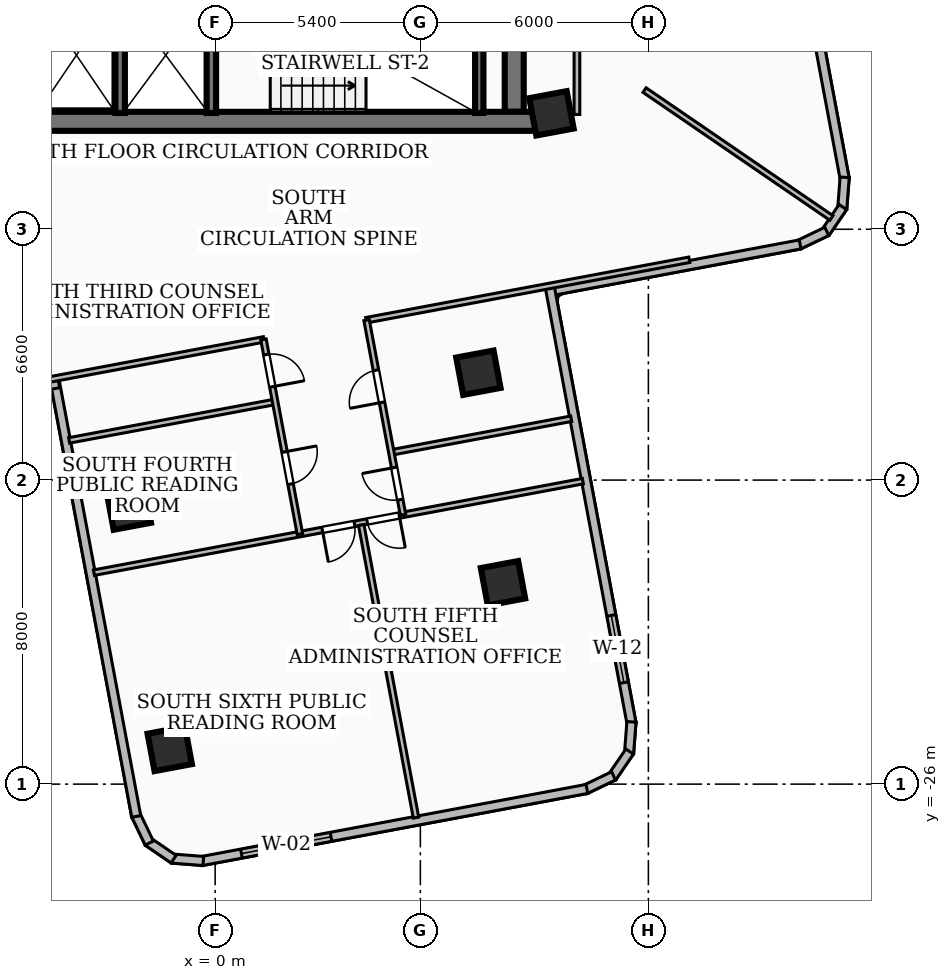
"""IFC4 building model, lengths in metres.
Left out: names, types, materials, properties, quantities, classifications, styles, units other than length and angle.
Written with IfcOpenShell. Run it as: python <this file> out.ifc"""

import sys

from ifc_helpers import new_model, si_unit, direction, frame, frame_2d, origin, origin_2d, place, context, subcontext, project, spatial, rectangle, extrude, element, fill, save


model = new_model("IFC4")
c1 = context("Model", 3, precision=1e-05, world=origin(), true_north=direction((0.0, 1.0)))
c2 = subcontext(c1, "Body", "Model", "MODEL_VIEW")
j1 = project(units=[si_unit("LENGTHUNIT", "METRE"), si_unit("PLANEANGLEUNIT", "RADIAN")], contexts=[c1])
p1 = place(None, origin())
s1 = spatial("IfcSite", under=j1, at=p1, CompositionType="ELEMENT")
p2 = place(p1, origin())
s2 = spatial("IfcBuilding", under=s1, at=p2, CompositionType="ELEMENT")
p3 = place(p2, frame((0.0, 0.0, 100.08)))
s3 = spatial("IfcBuildingStorey", under=s2, at=p3, CompositionType="ELEMENT", Elevation=100.08)
p4 = place(p3, frame((8.78, -8.56, 0.0), z_axis=(0.0, 0.0, 1.0), x_axis=(-1.0, 0.0, 0.0)))
e1 = element("IfcWall", 1, at=p4, inside=s3, PredefinedType="SHEAR", context=c2, shape_type="SweptSolid", body=[
    extrude(rectangle(XDim=17.56, YDim=0.5, at=frame_2d((8.78, 0.0))), origin(), (0.0, 0.0, 1.0), 3.34),
])
p5 = place(p3, frame((7.87, -2.0, 0.0), z_axis=(0.0, 0.0, 1.0), x_axis=(0.0, -1.0, 0.0)))
e2 = element("IfcWall", 2, at=p5, inside=s3, PredefinedType="SHEAR", context=c2, shape_type="SweptSolid", body=[
    extrude(rectangle(XDim=6.31, YDim=0.5, at=frame_2d((3.155, 0.0))), origin(), (0.0, 0.0, 1.0), 3.34),
])
p6 = place(p3, frame((6.95, -8.34, 0.0), z_axis=(0.0, 0.0, 1.0), x_axis=(0.0, 1.0, 0.0)))
e3 = element("IfcWall", 3, at=p6, inside=s3, PredefinedType="SOLIDWALL", context=c2, shape_type="SweptSolid", body=[
    extrude(rectangle(XDim=3.06, YDim=0.22, at=frame_2d((1.53, 0.0))), origin(), (0.0, 0.0, 1.0), 3.34),
])
for number, where, z_axis, x_axis in (
    (4, (-0.1, -8.34, 0.0), (0.0, 0.0, 1.0), (0.0, 1.0, 0.0)),
    (5, (-2.5, -8.34, 0.0), (0.0, 0.0, 1.0), (0.0, 1.0, 0.0)),
):
    element("IfcWall", number, at=place(p3, frame(where, z_axis=z_axis, x_axis=x_axis)), inside=s3, PredefinedType="SOLIDWALL", context=c2, shape_type="SweptSolid", body=[
        extrude(rectangle(XDim=3.04, YDim=0.25, at=frame_2d((1.52, 0.0))), origin(), (0.0, 0.0, 1.0), 3.34),
    ])
for number, where, z_axis, x_axis in (
    (6, (8.85, -8.35, 0.0), (0.0, 0.0, 1.0), (0.983, 0.184, 0.0)),
    (7, (-2.271, -18.724, 0.0), (0.0, 0.0, 1.0), (0.983, 0.184, 0.0)),
    (8, (6.927, -15.175, 0.0), (0.0, 0.0, 1.0), (0.983, 0.184, 0.0)),
    (9, (-1.195, -25.074, 0.0), (0.0, 0.0, 1.0), (0.983, 0.184, 0.0)),
    (10, (7.574, -20.714, 0.0), (0.0, 0.0, 1.0), (0.983, 0.184, 0.0)),
):
    element("IfcColumn", number, at=place(p3, frame(where, z_axis=z_axis, x_axis=x_axis)), inside=s3, PredefinedType="COLUMN", context=c2, shape_type="SweptSolid", body=[
        extrude(rectangle(XDim=1.0, YDim=1.0, at=origin_2d()), origin(), (0.0, 0.0, 1.0), 3.6),
    ])
p7 = place(p3, frame((15.45, -4.113, 0.0), z_axis=(0.0, 0.0, 1.0), x_axis=(0.18406771587, -0.982913564854, 0.0)))
e11 = element("IfcWall", 11, at=p7, inside=s3, PredefinedType="SOLIDWALL", context=c2, shape_type="SweptSolid", body=[
    extrude(rectangle(XDim=6.075, YDim=0.24, at=frame_2d((3.037, 0.0))), origin(), (0.0, 0.0, 1.0), 3.34),
])
p8 = place(p3, frame((16.565, -10.034, 0.0), z_axis=(0.0, 0.0, 1.0), x_axis=(-0.077011179273, -0.997030229365, 0.0)))
e12 = element("IfcWall", 12, at=p8, inside=s3, PredefinedType="SOLIDWALL", context=c2, shape_type="SweptSolid", body=[
    extrude(rectangle(XDim=0.831, YDim=0.24, at=frame_2d((0.415, 0.0))), origin(), (0.0, 0.0, 1.0), 3.34),
])
p9 = place(p3, frame((16.517, -10.816, 0.0), z_axis=(0.0, 0.0, 1.0), x_axis=(-0.563941688624, -0.825814611055, 0.0)))
e13 = element("IfcWall", 13, at=p9, inside=s3, PredefinedType="SOLIDWALL", context=c2, shape_type="SweptSolid", body=[
    extrude(rectangle(XDim=0.814, YDim=0.24, at=frame_2d((0.407, 0.0))), origin(), (0.0, 0.0, 1.0), 3.34),
])
p10 = place(p3, frame((16.095, -11.456, 0.0), z_axis=(0.0, 0.0, 1.0), x_axis=(-0.902044756706, -0.431642510533, 0.0)))
e14 = element("IfcWall", 14, at=p10, inside=s3, PredefinedType="SOLIDWALL", context=c2, shape_type="SweptSolid", body=[
    extrude(rectangle(XDim=0.832, YDim=0.24, at=frame_2d((0.416, 0.0))), origin(), (0.0, 0.0, 1.0), 3.34),
])
p11 = place(p3, frame((15.393, -11.799, 0.0), z_axis=(0.0, 0.0, 1.0), x_axis=(-0.982891759821, -0.184184115697, 0.0)))
e15 = element("IfcWall", 15, at=p11, inside=s3, PredefinedType="SOLIDWALL", context=c2, shape_type="SweptSolid", body=[
    extrude(rectangle(XDim=6.776, YDim=0.24, at=frame_2d((3.388, 0.0))), origin(), (0.0, 0.0, 1.0), 3.34),
])
p12 = place(p3, frame((8.809, -12.935, 0.0), z_axis=(0.0, 0.0, 1.0), x_axis=(0.184057484564, -0.98291548079, 0.0)))
e16 = element("IfcWall", 16, at=p12, inside=s3, PredefinedType="SOLIDWALL", context=c2, shape_type="SweptSolid", body=[
    extrude(rectangle(XDim=11.675, YDim=0.24, at=frame_2d((5.838, 0.0))), origin(), (0.0, 0.0, 1.0), 3.34),
])
p13 = place(p12, frame((8.775, 0.0, 0.85)))
e17 = element("IfcOpeningElement", 17, at=p13, cuts=e16, PredefinedType="OPENING", context=c2, shape_type="SweptSolid", body=[
    extrude(rectangle(XDim=1.8, YDim=1.6, at=frame_2d((0.9, 0.8))), frame((0.0, 0.13, 0.0), z_axis=(0.0, -1.0, 0.0), x_axis=(1.0, 0.0, 0.0)), (0.0, 0.0, 1.0), 0.26),
])
p14 = place(p3, frame((10.955, -24.361, 0.0), z_axis=(0.0, 0.0, 1.0), x_axis=(-0.077033754987, -0.997028485347, 0.0)))
e18 = element("IfcWall", 18, at=p14, inside=s3, PredefinedType="SOLIDWALL", context=c2, shape_type="SweptSolid", body=[
    extrude(rectangle(XDim=0.83, YDim=0.24, at=frame_2d((0.415, 0.0))), origin(), (0.0, 0.0, 1.0), 3.34),
])
p15 = place(p3, frame((10.907, -25.143, 0.0), z_axis=(0.0, 0.0, 1.0), x_axis=(-0.564898876177, -0.825160141847, 0.0)))
e19 = element("IfcWall", 19, at=p15, inside=s3, PredefinedType="SOLIDWALL", context=c2, shape_type="SweptSolid", body=[
    extrude(rectangle(XDim=0.814, YDim=0.24, at=frame_2d((0.407, 0.0))), origin(), (0.0, 0.0, 1.0), 3.34),
])
p16 = place(p3, frame((10.484, -25.783, 0.0), z_axis=(0.0, 0.0, 1.0), x_axis=(-0.901656054187, -0.432453881874, 0.0)))
e20 = element("IfcWall", 20, at=p16, inside=s3, PredefinedType="SOLIDWALL", context=c2, shape_type="SweptSolid", body=[
    extrude(rectangle(XDim=0.831, YDim=0.24, at=frame_2d((0.415, 0.0))), origin(), (0.0, 0.0, 1.0), 3.34),
])
p17 = place(p3, frame((9.783, -26.126, 0.0), z_axis=(0.0, 0.0, 1.0), x_axis=(-0.98292624202, -0.184000007471, 0.0)))
e21 = element("IfcWall", 21, at=p17, inside=s3, PredefinedType="SOLIDWALL", context=c2, shape_type="SweptSolid", body=[
    extrude(rectangle(XDim=10.32, YDim=0.24, at=frame_2d((5.16, 0.0))), origin(), (0.0, 0.0, 1.0), 3.34),
])
p18 = place(p17, frame((6.85, 0.0, 0.85)))
e22 = element("IfcOpeningElement", 22, at=p18, cuts=e21, PredefinedType="OPENING", context=c2, shape_type="SweptSolid", body=[
    extrude(rectangle(XDim=2.4, YDim=2.1, at=frame_2d((1.2, 1.05))), frame((0.0, 0.13, 0.0), z_axis=(0.0, -1.0, 0.0), x_axis=(1.0, 0.0, 0.0)), (0.0, 0.0, 1.0), 0.26),
])
p19 = place(p3, frame((-0.311, -28.022, 0.0), z_axis=(0.0, 0.0, 1.0), x_axis=(-0.997028485347, 0.077033754987, 0.0)))
e23 = element("IfcWall", 23, at=p19, inside=s3, PredefinedType="SOLIDWALL", context=c2, shape_type="SweptSolid", body=[
    extrude(rectangle(XDim=0.83, YDim=0.24, at=frame_2d((0.415, 0.0))), origin(), (0.0, 0.0, 1.0), 3.34),
])
p20 = place(p3, frame((-1.093, -27.974, 0.0), z_axis=(0.0, 0.0, 1.0), x_axis=(-0.825020375165, 0.565102982263, 0.0)))
e24 = element("IfcWall", 24, at=p20, inside=s3, PredefinedType="SOLIDWALL", context=c2, shape_type="SweptSolid", body=[
    extrude(rectangle(XDim=0.814, YDim=0.24, at=frame_2d((0.407, 0.0))), origin(), (0.0, 0.0, 1.0), 3.34),
])
p21 = place(p3, frame((-1.733, -27.551, 0.0), z_axis=(0.0, 0.0, 1.0), x_axis=(-0.432339276243, 0.901711012585, 0.0)))
e25 = element("IfcWall", 25, at=p21, inside=s3, PredefinedType="SOLIDWALL", context=c2, shape_type="SweptSolid", body=[
    extrude(rectangle(XDim=0.831, YDim=0.24, at=frame_2d((0.415, 0.0))), origin(), (0.0, 0.0, 1.0), 3.34),
])
p22 = place(p3, frame((-2.076, -26.85, 0.0), z_axis=(0.0, 0.0, 1.0), x_axis=(-0.18407390356, 0.982912406081, 0.0)))
e26 = element("IfcWall", 26, at=p22, inside=s3, PredefinedType="SOLIDWALL", context=c2, shape_type="SweptSolid", body=[
    extrude(rectangle(XDim=11.676, YDim=0.24, at=frame_2d((5.838, 0.0))), origin(), (0.0, 0.0, 1.0), 2.486),
])
p23 = place(p3, frame((-4.113, -15.45, 0.0), z_axis=(0.0, 0.0, 1.0), x_axis=(-0.982913564854, -0.18406771587, 0.0)))
e27 = element("IfcWall", 27, at=p23, inside=s3, PredefinedType="SOLIDWALL", context=c2, shape_type="SweptSolid", body=[
    extrude(rectangle(XDim=6.075, YDim=0.24, at=frame_2d((3.037, 0.0))), origin(), (0.0, 0.0, 1.0), 2.486),
])
p24 = place(p3, frame((9.52, -8.38, 0.0), z_axis=(0.0, 0.0, 1.0), x_axis=(0.0, 1.0, 0.0)))
e28 = element("IfcWall", 28, at=p24, inside=s3, PredefinedType="PARTITIONING", context=c2, shape_type="SweptSolid", body=[
    extrude(rectangle(XDim=6.63, YDim=0.15, at=frame_2d((3.315, 0.0))), origin(), (0.0, 0.0, 1.0), 2.486),
])
p25 = place(p3, frame((11.3, -7.738, 0.0), z_axis=(0.0, 0.0, 1.0), x_axis=(0.825173577049, -0.564879250584, 0.0)))
e29 = element("IfcWall", 29, at=p25, inside=s3, PredefinedType="PARTITIONING", context=c2, shape_type="SweptSolid", body=[
    extrude(rectangle(XDim=5.959, YDim=0.145, at=frame_2d((2.979, 0.0))), origin(), (0.0, 0.0, 1.0), 3.34),
])
p26 = place(p3, frame((3.975, -13.794, 0.0), z_axis=(0.0, 0.0, 1.0), x_axis=(0.982936035358, 0.183947683851, 0.0)))
e30 = element("IfcWall", 30, at=p26, inside=s3, PredefinedType="PARTITIONING", context=c2, shape_type="SweptSolid", body=[
    extrude(rectangle(XDim=8.65, YDim=0.145, at=frame_2d((4.325, 0.0))), origin(), (0.0, 0.0, 1.0), 2.486),
])
p27 = place(p3, frame((-6.532, -15.761, 0.0), z_axis=(0.0, 0.0, 1.0), x_axis=(0.98292290903, 0.184017811376, 0.0)))
e31 = element("IfcWall", 31, at=p27, inside=s3, PredefinedType="PARTITIONING", context=c2, shape_type="SweptSolid", body=[
    extrude(rectangle(XDim=7.95, YDim=0.145, at=frame_2d((3.975, 0.0))), origin(), (0.0, 0.0, 1.0), 2.486),
])
p28 = place(p3, frame((4.656, -17.268, 0.0), z_axis=(0.0, 0.0, 1.0), x_axis=(0.982932084341, 0.183968795106, 0.0)))
e32 = element("IfcWall", 32, at=p28, inside=s3, PredefinedType="PARTITIONING", context=c2, shape_type="SweptSolid", body=[
    extrude(rectangle(XDim=4.795, YDim=0.145, at=frame_2d((2.397, 0.0))), origin(), (0.0, 0.0, 1.0), 2.486),
])
p29 = place(p3, frame((-3.842, -16.956, 0.0), z_axis=(0.0, 0.0, 1.0), x_axis=(0.982934991676, 0.183953260746, 0.0)))
e33 = element("IfcWall", 33, at=p29, inside=s3, PredefinedType="PARTITIONING", context=c2, shape_type="SweptSolid", body=[
    extrude(rectangle(XDim=5.496, YDim=0.145, at=frame_2d((2.748, 0.0))), origin(), (0.0, 0.0, 1.0), 2.486),
])
p30 = place(p3, frame((4.944, -18.913, 0.0), z_axis=(0.0, 0.0, 1.0), x_axis=(-0.184062192303, 0.982914599222, 0.0)))
e34 = element("IfcWall", 34, at=p30, inside=s3, PredefinedType="PARTITIONING", context=c2, shape_type="SweptSolid", body=[
    extrude(rectangle(XDim=5.21, YDim=0.145, at=frame_2d((2.605, 0.0))), origin(), (0.0, 0.0, 1.0), 3.34),
])
p31 = place(p30, frame((3.01, 0.0, 0.0)))
e35 = element("IfcOpeningElement", 35, at=p31, cuts=e34, PredefinedType="OPENING", context=c2, shape_type="SweptSolid", body=[
    extrude(rectangle(XDim=0.86, YDim=2.04, at=frame_2d((0.43, 1.02))), frame((0.0, 0.083, 0.0), z_axis=(0.0, -1.0, 0.0), x_axis=(1.0, 0.0, 0.0)), (0.0, 0.0, 1.0), 0.165),
])
p32 = place(p30, frame((0.405, 0.0, 0.0)))
e36 = element("IfcOpeningElement", 36, at=p32, cuts=e34, PredefinedType="OPENING", context=c2, shape_type="SweptSolid", body=[
    extrude(rectangle(XDim=0.86, YDim=2.04, at=frame_2d((0.43, 1.02))), frame((0.0, 0.083, 0.0), z_axis=(0.0, -1.0, 0.0), x_axis=(1.0, 0.0, 0.0)), (0.0, 0.0, 1.0), 0.165),
])
p33 = place(p3, frame((1.272, -14.3, 0.0), z_axis=(0.0, 0.0, 1.0), x_axis=(0.184070670298, -0.982913011581, 0.0)))
e37 = element("IfcWall", 37, at=p33, inside=s3, PredefinedType="PARTITIONING", context=c2, shape_type="SweptSolid", body=[
    extrude(rectangle(XDim=5.21, YDim=0.145, at=frame_2d((2.605, 0.0))), origin(), (0.0, 0.0, 1.0), 3.34),
])
p34 = place(p33, frame((0.405, 0.0, 0.0)))
e38 = element("IfcOpeningElement", 38, at=p34, cuts=e37, PredefinedType="OPENING", context=c2, shape_type="SweptSolid", body=[
    extrude(rectangle(XDim=0.86, YDim=2.04, at=frame_2d((0.43, 1.02))), frame((0.0, 0.083, 0.0), z_axis=(0.0, -1.0, 0.0), x_axis=(1.0, 0.0, 0.0)), (0.0, 0.0, 1.0), 0.165),
])
p35 = place(p33, frame((3.01, 0.0, 0.0)))
e39 = element("IfcOpeningElement", 39, at=p35, cuts=e37, PredefinedType="OPENING", context=c2, shape_type="SweptSolid", body=[
    extrude(rectangle(XDim=0.86, YDim=2.04, at=frame_2d((0.43, 1.02))), frame((0.0, 0.083, 0.0), z_axis=(0.0, -1.0, 0.0), x_axis=(1.0, 0.0, 0.0)), (0.0, 0.0, 1.0), 0.165),
])
p36 = place(p3, frame((3.844, -19.18, 0.0), z_axis=(0.0, 0.0, 1.0), x_axis=(0.183912237739, -0.982942668119, 0.0)))
e40 = element("IfcWall", 40, at=p36, inside=s3, PredefinedType="PARTITIONING", context=c2, shape_type="SweptSolid", body=[
    extrude(rectangle(XDim=7.835, YDim=0.145, at=frame_2d((3.917, 0.0))), origin(), (0.0, 0.0, 1.0), 2.832),
])
p37 = place(p3, frame((9.676, -18.028, 0.0), z_axis=(0.0, 0.0, 1.0), x_axis=(-0.98293315623, -0.183963067988, 0.0)))
e41 = element("IfcWall", 41, at=p37, inside=s3, PredefinedType="PARTITIONING", context=c2, shape_type="SweptSolid", body=[
    extrude(rectangle(XDim=13.089, YDim=0.145, at=frame_2d((6.545, 0.0))), origin(), (0.0, 0.0, 1.0), 2.486),
])
p38 = place(p37, frame((6.115, 0.0, 0.0)))
e42 = element("IfcOpeningElement", 42, at=p38, cuts=e41, PredefinedType="OPENING", context=c2, shape_type="SweptSolid", body=[
    extrude(rectangle(XDim=0.86, YDim=2.04, at=frame_2d((0.43, 1.02))), frame((0.0, 0.083, 0.0), z_axis=(0.0, -1.0, 0.0), x_axis=(1.0, 0.0, 0.0)), (0.0, 0.0, 1.0), 0.165),
])
p39 = place(p37, frame((4.915, 0.0, 0.0)))
e43 = element("IfcOpeningElement", 43, at=p39, cuts=e41, PredefinedType="OPENING", context=c2, shape_type="SweptSolid", body=[
    extrude(rectangle(XDim=0.86, YDim=2.04, at=frame_2d((0.43, 1.02))), frame((0.0, 0.083, 0.0), z_axis=(0.0, -1.0, 0.0), x_axis=(1.0, 0.0, 0.0)), (0.0, 0.0, 1.0), 0.165),
])
p40 = place(p13, origin())
e44 = element("IfcWindow", 44, at=p40, inside=s3, PartitioningType="SINGLE_PANEL", PredefinedType="WINDOW", context=c2, shape_type="SweptSolid", body=[
    extrude(rectangle(XDim=1.8, YDim=1.6, at=frame_2d((0.9, 0.8))), frame((0.0, 0.03, 0.0), z_axis=(0.0, -1.0, 0.0), x_axis=(1.0, 0.0, 0.0)), (0.0, 0.0, 1.0), 0.06),
])
fill(e17, e44)
p41 = place(p18, origin())
e45 = element("IfcWindow", 45, at=p41, inside=s3, PartitioningType="SINGLE_PANEL", PredefinedType="WINDOW", context=c2, shape_type="SweptSolid", body=[
    extrude(rectangle(XDim=2.4, YDim=2.1, at=frame_2d((1.2, 1.05))), frame((0.0, 0.03, 0.0), z_axis=(0.0, -1.0, 0.0), x_axis=(1.0, 0.0, 0.0)), (0.0, 0.0, 1.0), 0.06),
])
fill(e22, e45)
p42 = place(p31, origin())
e46 = element("IfcDoor", 46, at=p42, inside=s3, OperationType="SINGLE_SWING_LEFT", PredefinedType="DOOR", context=c2, shape_type="SweptSolid", body=[
    extrude(rectangle(XDim=0.86, YDim=2.04, at=frame_2d((0.43, 1.02))), frame((0.0, 0.025, 0.0), z_axis=(0.0, -1.0, 0.0), x_axis=(1.0, 0.0, 0.0)), (0.0, 0.0, 1.0), 0.05),
])
fill(e35, e46)
p43 = place(p32, origin())
e47 = element("IfcDoor", 47, at=p43, inside=s3, OperationType="SINGLE_SWING_RIGHT", PredefinedType="DOOR", context=c2, shape_type="SweptSolid", body=[
    extrude(rectangle(XDim=0.86, YDim=2.04, at=frame_2d((0.43, 1.02))), frame((0.0, 0.025, 0.0), z_axis=(0.0, -1.0, 0.0), x_axis=(1.0, 0.0, 0.0)), (0.0, 0.0, 1.0), 0.05),
])
fill(e36, e47)
p44 = place(p34, origin())
e48 = element("IfcDoor", 48, at=p44, inside=s3, OperationType="SINGLE_SWING_RIGHT", PredefinedType="DOOR", context=c2, shape_type="SweptSolid", body=[
    extrude(rectangle(XDim=0.86, YDim=2.04, at=frame_2d((0.43, 1.02))), frame((0.0, 0.025, 0.0), z_axis=(0.0, -1.0, 0.0), x_axis=(1.0, 0.0, 0.0)), (0.0, 0.0, 1.0), 0.05),
])
fill(e38, e48)
p45 = place(p35, origin())
e49 = element("IfcDoor", 49, at=p45, inside=s3, OperationType="SINGLE_SWING_LEFT", PredefinedType="DOOR", context=c2, shape_type="SweptSolid", body=[
    extrude(rectangle(XDim=0.86, YDim=2.04, at=frame_2d((0.43, 1.02))), frame((0.0, 0.025, 0.0), z_axis=(0.0, -1.0, 0.0), x_axis=(1.0, 0.0, 0.0)), (0.0, 0.0, 1.0), 0.05),
])
fill(e39, e49)
p46 = place(p38, origin())
e50 = element("IfcDoor", 50, at=p46, inside=s3, OperationType="SINGLE_SWING_RIGHT", PredefinedType="DOOR", context=c2, shape_type="SweptSolid", body=[
    extrude(rectangle(XDim=0.86, YDim=2.04, at=frame_2d((0.43, 1.02))), frame((0.0, 0.025, 0.0), z_axis=(0.0, -1.0, 0.0), x_axis=(1.0, 0.0, 0.0)), (0.0, 0.0, 1.0), 0.05),
])
fill(e42, e50)
p47 = place(p39, origin())
e51 = element("IfcDoor", 51, at=p47, inside=s3, OperationType="SINGLE_SWING_LEFT", PredefinedType="DOOR", context=c2, shape_type="SweptSolid", body=[
    extrude(rectangle(XDim=0.86, YDim=2.04, at=frame_2d((0.43, 1.02))), frame((0.0, 0.025, 0.0), z_axis=(0.0, -1.0, 0.0), x_axis=(1.0, 0.0, 0.0)), (0.0, 0.0, 1.0), 0.05),
])
fill(e43, e51)
save(model, sys.argv[1])
